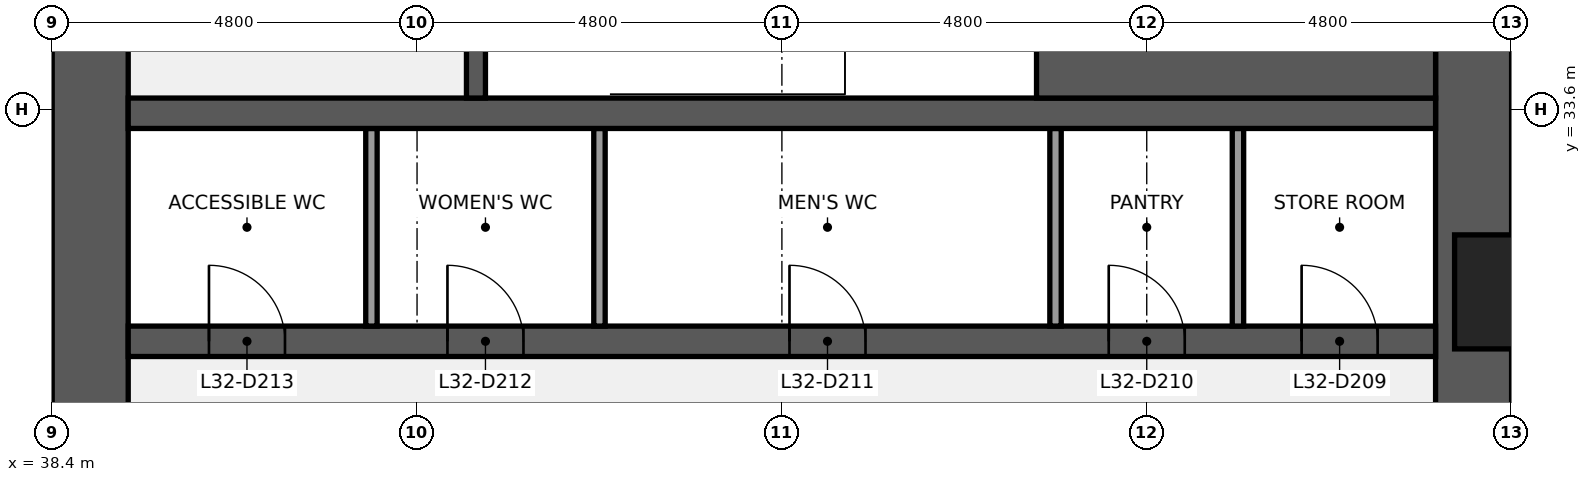
"""IFC4 building model, lengths in metres.
Left out: names, types, materials, properties, quantities, classifications, styles, units other than length and angle.
Written with IfcOpenShell. Run it as: python <this file> out.ifc"""

import sys

from ifc_helpers import new_model, si_unit, direction, frame, frame_2d, origin, place, context, subcontext, project, spatial, rectangle, extrude, element, fill, save


model = new_model("IFC4")
c1 = context("Model", 3, precision=1e-05, world=origin(), true_north=direction((0.0, 1.0)))
c2 = subcontext(c1, "Body", "Model", "MODEL_VIEW")
j1 = project(units=[si_unit("LENGTHUNIT", "METRE"), si_unit("PLANEANGLEUNIT", "RADIAN")], contexts=[c1])
p1 = place(None, origin())
s1 = spatial("IfcSite", under=j1, at=p1, CompositionType="ELEMENT")
p2 = place(p1, origin())
s2 = spatial("IfcBuilding", under=s1, at=p2, CompositionType="ELEMENT")
p3 = place(p2, frame((0.0, 0.0, 148.1)))
s3 = spatial("IfcBuildingStorey", under=s2, at=p3, CompositionType="ELEMENT", Elevation=148.1)
p4 = place(p3, frame((57.1, 38.4, 0.0), z_axis=(0.0, 0.0, 1.0), x_axis=(0.0, -1.0, 0.0)))
e1 = element("IfcWall", 1, at=p4, inside=s3, PredefinedType="SHEAR", context=c2, shape_type="SweptSolid", body=[
    extrude(rectangle(XDim=28.8, YDim=1.0, at=frame_2d((14.4, 0.0))), origin(), (0.0, 0.0, 1.0), 3.84),
])
p5 = place(p4, frame((18.45, 0.0, 0.9)))
e2 = element("IfcOpeningElement", 2, at=p5, cuts=e1, PredefinedType="OPENING", context=c2, shape_type="SweptSolid", body=[
    extrude(rectangle(XDim=1.5, YDim=1.5, at=frame_2d((0.75, 0.75))), frame((0.0, 0.51, 0.0), z_axis=(0.0, -1.0, 0.0), x_axis=(1.0, 0.0, 0.0)), (0.0, 0.0, 1.0), 1.02),
])
p6 = place(p4, frame((8.85, 0.0, 0.9)))
e3 = element("IfcOpeningElement", 3, at=p6, cuts=e1, PredefinedType="OPENING", context=c2, shape_type="SweptSolid", body=[
    extrude(rectangle(XDim=1.5, YDim=1.5, at=frame_2d((0.75, 0.75))), frame((0.0, 0.51, 0.0), z_axis=(0.0, -1.0, 0.0), x_axis=(1.0, 0.0, 0.0)), (0.0, 0.0, 1.0), 1.02),
])
p7 = place(p3, frame((38.9, 9.6, 0.0), z_axis=(0.0, 0.0, 1.0), x_axis=(0.0, 1.0, 0.0)))
e4 = element("IfcWall", 4, at=p7, inside=s3, PredefinedType="SHEAR", context=c2, shape_type="SweptSolid", body=[
    extrude(rectangle(XDim=28.8, YDim=1.0, at=frame_2d((14.4, 0.0))), origin(), (0.0, 0.0, 1.0), 3.84),
])
p8 = place(p7, frame((8.7, 0.0, 0.0)))
e5 = element("IfcOpeningElement", 5, at=p8, cuts=e4, PredefinedType="OPENING", context=c2, shape_type="SweptSolid", body=[
    extrude(rectangle(XDim=1.8, YDim=2.1, at=frame_2d((0.9, 1.05))), frame((0.0, 0.51, 0.0), z_axis=(0.0, -1.0, 0.0), x_axis=(1.0, 0.0, 0.0)), (0.0, 0.0, 1.0), 1.02),
])
p9 = place(p7, frame((18.3, 0.0, 0.0)))
e6 = element("IfcOpeningElement", 6, at=p9, cuts=e4, PredefinedType="OPENING", context=c2, shape_type="SweptSolid", body=[
    extrude(rectangle(XDim=1.8, YDim=2.1, at=frame_2d((0.9, 1.05))), frame((0.0, 0.51, 0.0), z_axis=(0.0, -1.0, 0.0), x_axis=(1.0, 0.0, 0.0)), (0.0, 0.0, 1.0), 1.02),
])
p10 = place(p3, frame((39.4, 30.55, 0.0), z_axis=(0.0, 0.0, 1.0), x_axis=(1.0, 0.0, 0.0)))
e7 = element("IfcWall", 7, at=p10, inside=s3, PredefinedType="SHEAR", context=c2, shape_type="SweptSolid", body=[
    extrude(rectangle(XDim=17.2, YDim=0.4, at=frame_2d((8.6, 0.0))), origin(), (0.0, 0.0, 1.0), 3.84),
])
p11 = place(p10, frame((15.438, 0.0, 0.0)))
e8 = element("IfcOpeningElement", 8, at=p11, cuts=e7, PredefinedType="OPENING", context=c2, shape_type="SweptSolid", body=[
    extrude(rectangle(XDim=1.0, YDim=2.1, at=frame_2d((0.5, 1.05))), frame((0.0, 0.21, 0.0), z_axis=(0.0, -1.0, 0.0), x_axis=(1.0, 0.0, 0.0)), (0.0, 0.0, 1.0), 0.42),
])
p12 = place(p10, frame((12.9, 0.0, 0.0)))
e9 = element("IfcOpeningElement", 9, at=p12, cuts=e7, PredefinedType="OPENING", context=c2, shape_type="SweptSolid", body=[
    extrude(rectangle(XDim=1.0, YDim=2.1, at=frame_2d((0.5, 1.05))), frame((0.0, 0.21, 0.0), z_axis=(0.0, -1.0, 0.0), x_axis=(1.0, 0.0, 0.0)), (0.0, 0.0, 1.0), 0.42),
])
p13 = place(p10, frame((8.7, 0.0, 0.0)))
e10 = element("IfcOpeningElement", 10, at=p13, cuts=e7, PredefinedType="OPENING", context=c2, shape_type="SweptSolid", body=[
    extrude(rectangle(XDim=1.0, YDim=2.1, at=frame_2d((0.5, 1.05))), frame((0.0, 0.21, 0.0), z_axis=(0.0, -1.0, 0.0), x_axis=(1.0, 0.0, 0.0)), (0.0, 0.0, 1.0), 0.42),
])
p14 = place(p10, frame((4.2, 0.0, 0.0)))
e11 = element("IfcOpeningElement", 11, at=p14, cuts=e7, PredefinedType="OPENING", context=c2, shape_type="SweptSolid", body=[
    extrude(rectangle(XDim=1.0, YDim=2.1, at=frame_2d((0.5, 1.05))), frame((0.0, 0.21, 0.0), z_axis=(0.0, -1.0, 0.0), x_axis=(1.0, 0.0, 0.0)), (0.0, 0.0, 1.0), 0.42),
])
p15 = place(p10, frame((1.062, 0.0, 0.0)))
e12 = element("IfcOpeningElement", 12, at=p15, cuts=e7, PredefinedType="OPENING", context=c2, shape_type="SweptSolid", body=[
    extrude(rectangle(XDim=1.0, YDim=2.1, at=frame_2d((0.5, 1.05))), frame((0.0, 0.21, 0.0), z_axis=(0.0, -1.0, 0.0), x_axis=(1.0, 0.0, 0.0)), (0.0, 0.0, 1.0), 0.42),
])
for number, where, z_axis, x_axis in (
    (13, (54.0, 30.75, 0.0), (0.0, 0.0, 1.0), (0.0, 1.0, 0.0)),
    (14, (51.6, 30.75, 0.0), (0.0, 0.0, 1.0), (0.0, 1.0, 0.0)),
    (15, (45.6, 30.75, 0.0), (0.0, 0.0, 1.0), (0.0, 1.0, 0.0)),
    (16, (42.6, 30.75, 0.0), (0.0, 0.0, 1.0), (0.0, 1.0, 0.0)),
):
    element("IfcWall", number, at=place(p3, frame(where, z_axis=z_axis, x_axis=x_axis)), inside=s3, PredefinedType="PARTITIONING", context=c2, shape_type="SweptSolid", body=[
        extrude(rectangle(XDim=2.6, YDim=0.15, at=frame_2d((1.3, 0.0))), origin(), (0.0, 0.0, 1.0), 3.84),
    ])
p16 = place(p3, frame((39.4, 33.55, 0.0), z_axis=(0.0, 0.0, 1.0), x_axis=(1.0, 0.0, 0.0)))
e17 = element("IfcWall", 17, at=p16, inside=s3, PredefinedType="SHEAR", context=c2, shape_type="SweptSolid", body=[
    extrude(rectangle(XDim=17.2, YDim=0.4, at=frame_2d((8.6, 0.0))), origin(), (0.0, 0.0, 1.0), 3.84),
])
p17 = place(p3, frame((51.35, 35.575, 0.0), z_axis=(0.0, 0.0, 1.0), x_axis=(1.0, 0.0, 0.0)))
e18 = element("IfcWall", 18, at=p17, inside=s3, PredefinedType="SHEAR", context=c2, shape_type="SweptSolid", body=[
    extrude(rectangle(XDim=5.25, YDim=3.65, at=frame_2d((2.625, 0.0))), origin(), (0.0, 0.0, 1.0), 3.84),
])
p18 = place(p3, frame((43.975, 33.75, 0.0), z_axis=(0.0, 0.0, 1.0), x_axis=(0.0, 1.0, 0.0)))
e19 = element("IfcWall", 19, at=p18, inside=s3, PredefinedType="SHEAR", context=c2, shape_type="SweptSolid", body=[
    extrude(rectangle(XDim=3.45, YDim=0.25, at=frame_2d((1.725, 0.0))), origin(), (0.0, 0.0, 1.0), 3.84),
])
p19 = place(p18, frame((1.175, 0.0, 0.0)))
e20 = element("IfcOpeningElement", 20, at=p19, cuts=e19, PredefinedType="OPENING", context=c2, shape_type="SweptSolid", body=[
    extrude(rectangle(XDim=1.1, YDim=2.1, at=frame_2d((0.55, 1.05))), frame((0.0, 0.135, 0.0), z_axis=(0.0, -1.0, 0.0), x_axis=(1.0, 0.0, 0.0)), (0.0, 0.0, 1.0), 0.27),
])
p20 = place(p11, origin())
e21 = element("IfcDoor", 21, at=p20, inside=s3, OperationType="SINGLE_SWING_LEFT", PredefinedType="DOOR", context=c2, shape_type="SweptSolid", body=[
    extrude(rectangle(XDim=1.0, YDim=2.1, at=frame_2d((0.5, 1.05))), frame((0.0, 0.025, 0.0), z_axis=(0.0, -1.0, 0.0), x_axis=(1.0, 0.0, 0.0)), (0.0, 0.0, 1.0), 0.05),
])
fill(e8, e21)
p21 = place(p12, origin())
e22 = element("IfcDoor", 22, at=p21, inside=s3, OperationType="SINGLE_SWING_LEFT", PredefinedType="DOOR", context=c2, shape_type="SweptSolid", body=[
    extrude(rectangle(XDim=1.0, YDim=2.1, at=frame_2d((0.5, 1.05))), frame((0.0, 0.025, 0.0), z_axis=(0.0, -1.0, 0.0), x_axis=(1.0, 0.0, 0.0)), (0.0, 0.0, 1.0), 0.05),
])
fill(e9, e22)
p22 = place(p13, origin())
e23 = element("IfcDoor", 23, at=p22, inside=s3, OperationType="SINGLE_SWING_LEFT", PredefinedType="DOOR", context=c2, shape_type="SweptSolid", body=[
    extrude(rectangle(XDim=1.0, YDim=2.1, at=frame_2d((0.5, 1.05))), frame((0.0, 0.025, 0.0), z_axis=(0.0, -1.0, 0.0), x_axis=(1.0, 0.0, 0.0)), (0.0, 0.0, 1.0), 0.05),
])
fill(e10, e23)
p23 = place(p14, origin())
e24 = element("IfcDoor", 24, at=p23, inside=s3, OperationType="SINGLE_SWING_LEFT", PredefinedType="DOOR", context=c2, shape_type="SweptSolid", body=[
    extrude(rectangle(XDim=1.0, YDim=2.1, at=frame_2d((0.5, 1.05))), frame((0.0, 0.025, 0.0), z_axis=(0.0, -1.0, 0.0), x_axis=(1.0, 0.0, 0.0)), (0.0, 0.0, 1.0), 0.05),
])
fill(e11, e24)
p24 = place(p15, origin())
e25 = element("IfcDoor", 25, at=p24, inside=s3, OperationType="SINGLE_SWING_LEFT", PredefinedType="DOOR", context=c2, shape_type="SweptSolid", body=[
    extrude(rectangle(XDim=1.0, YDim=2.1, at=frame_2d((0.5, 1.05))), frame((0.0, 0.025, 0.0), z_axis=(0.0, -1.0, 0.0), x_axis=(1.0, 0.0, 0.0)), (0.0, 0.0, 1.0), 0.05),
])
fill(e12, e25)
save(model, sys.argv[1])
